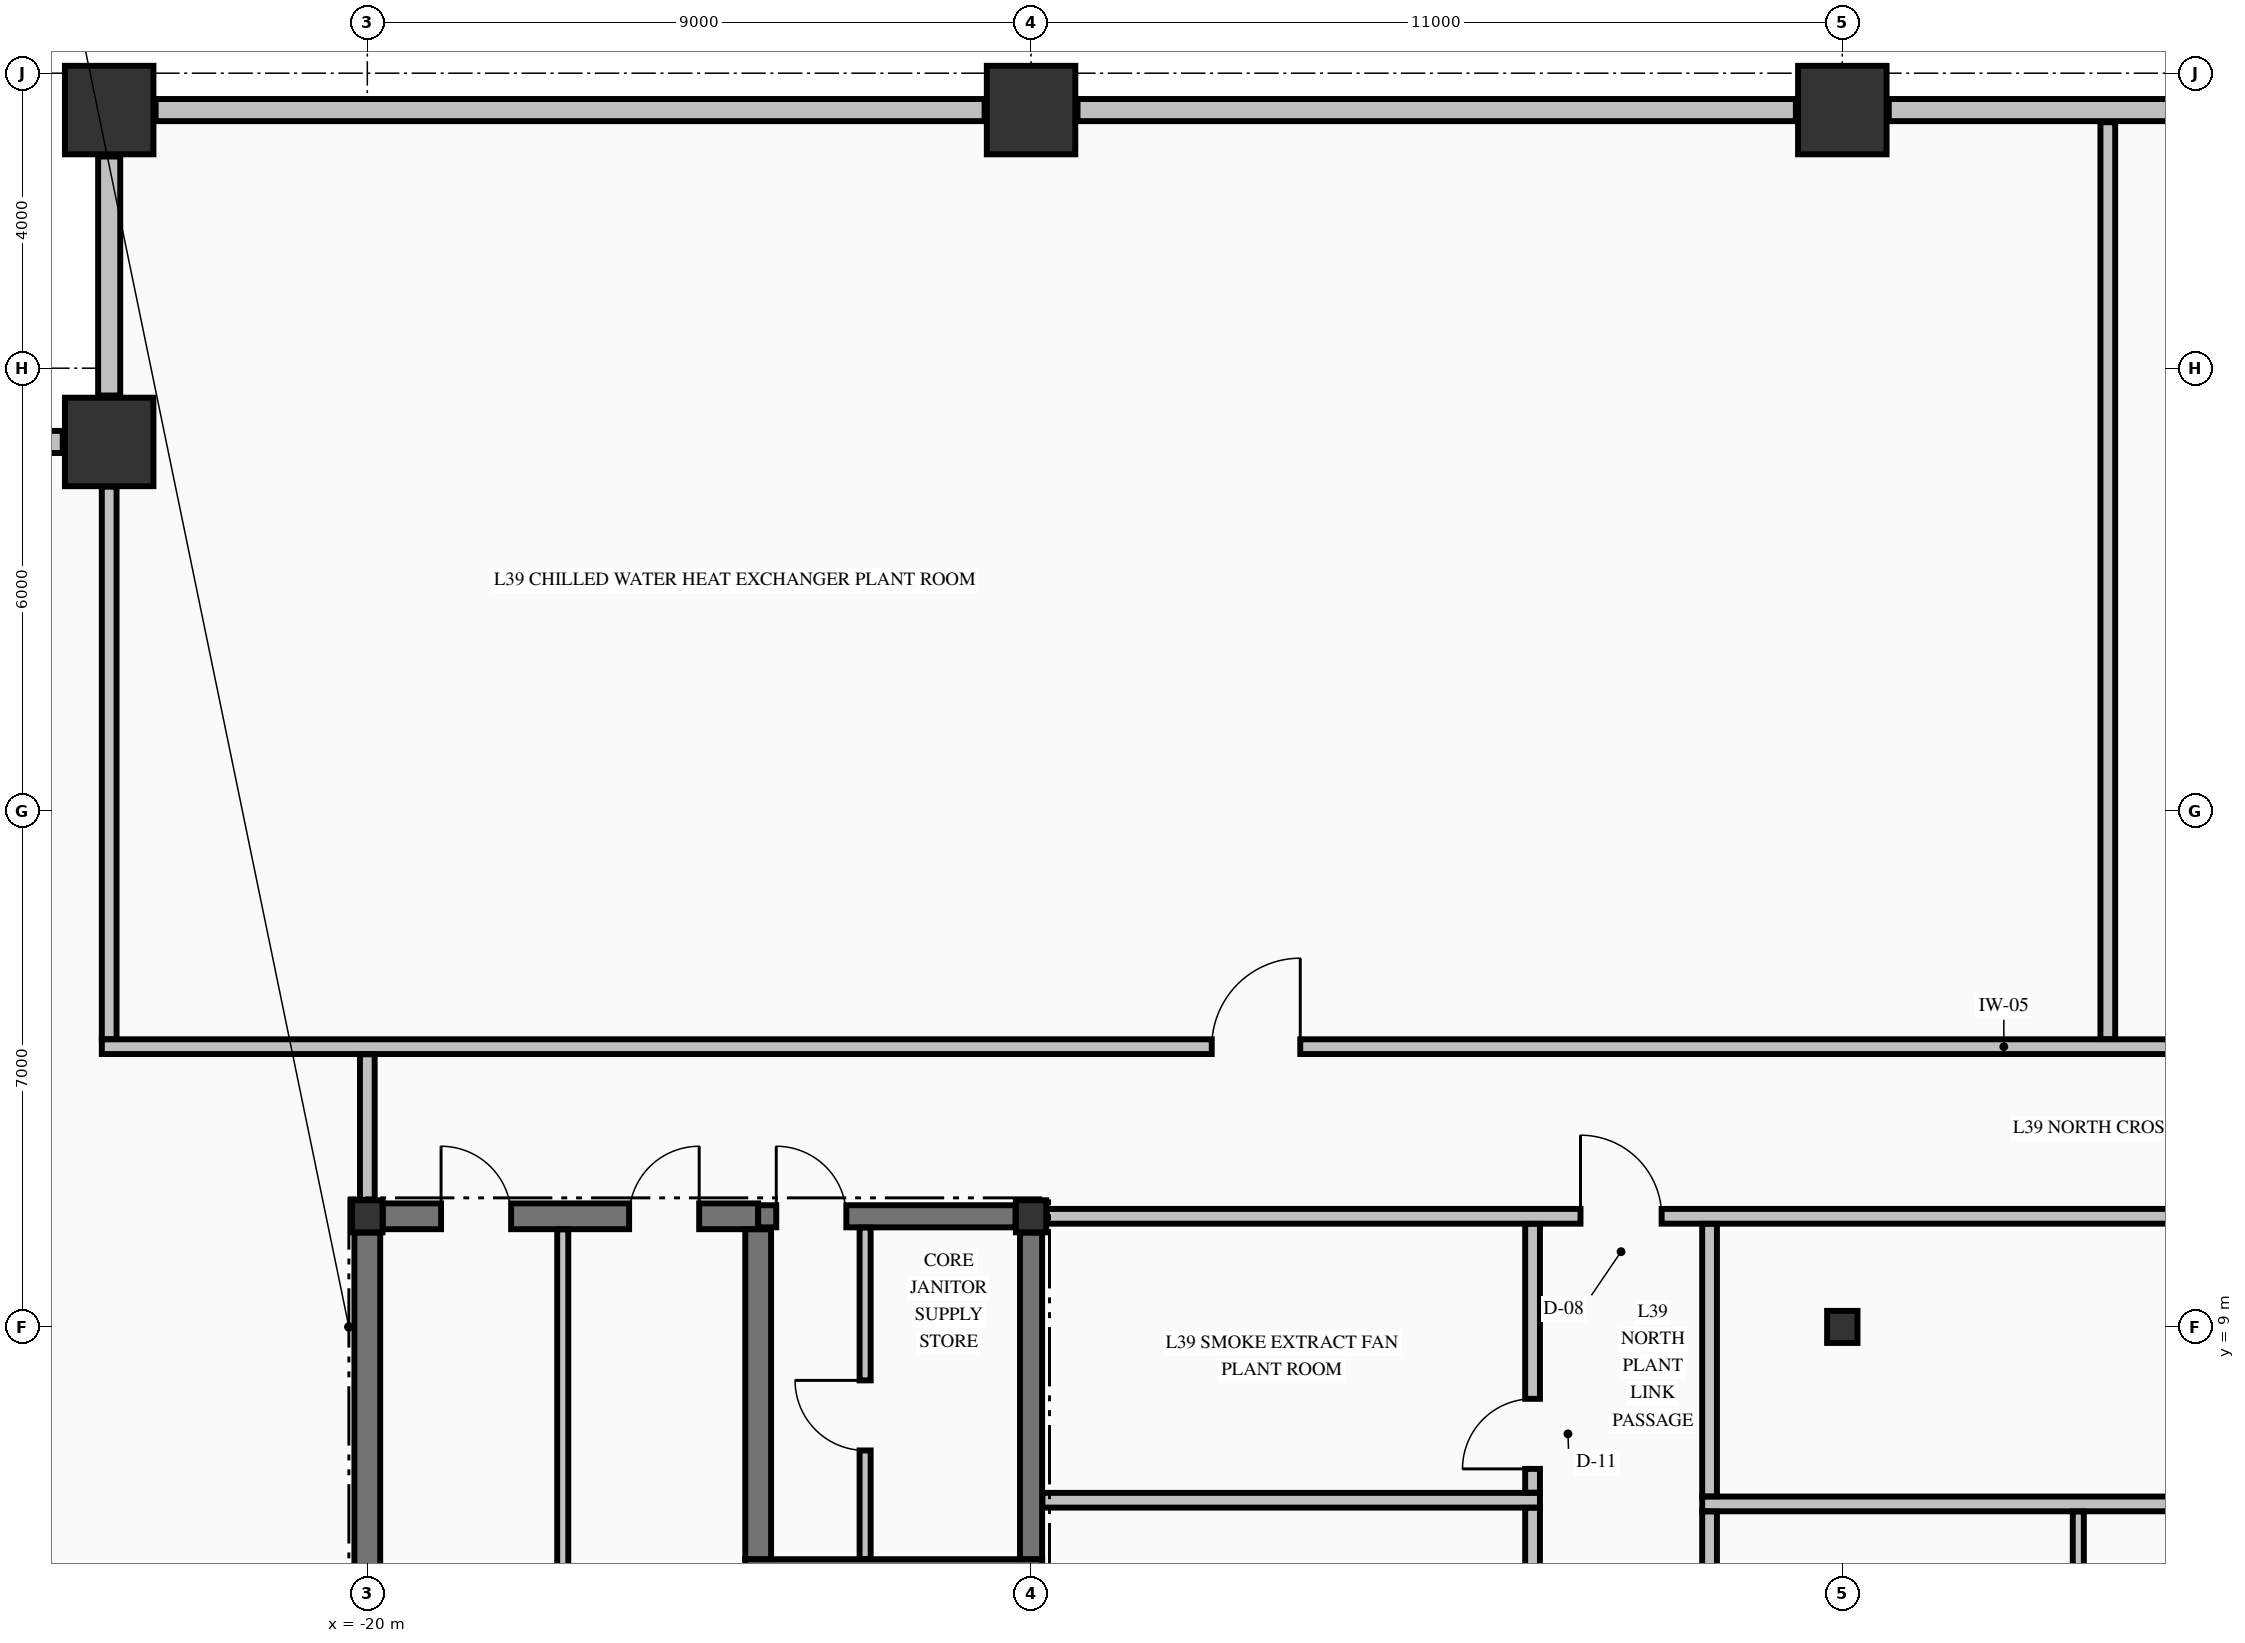
"""IFC4 building model, lengths in metres.
Left out: names, types, materials, properties, quantities, classifications, styles, units other than length and angle.
Written with IfcOpenShell. Run it as: python <this file> out.ifc"""

import sys

from ifc_helpers import new_model, si_unit, direction, frame, frame_2d, origin, origin_2d, place, context, subcontext, project, spatial, rectangle, i_section, extrude, element, fill, save


model = new_model("IFC4")
c1 = context("Model", 3, precision=1e-05, world=origin(), true_north=direction((0.0, 1.0)))
c2 = subcontext(c1, "Body", "Model", "MODEL_VIEW")
j1 = project(units=[si_unit("LENGTHUNIT", "METRE"), si_unit("PLANEANGLEUNIT", "RADIAN")], contexts=[c1])
p1 = place(None, origin())
s1 = spatial("IfcSite", under=j1, at=p1, CompositionType="ELEMENT")
p2 = place(p1, origin())
s2 = spatial("IfcBuilding", under=s1, at=p2, CompositionType="ELEMENT")
p3 = place(p2, frame((0.0, 0.0, 153.48)))
s3 = spatial("IfcBuildingStorey", under=s2, at=p3, CompositionType="ELEMENT", Elevation=153.48)
for number, where, z_axis, x_axis in (
    (1, (-23.5, 25.5, -0.425), (0.0, 0.0, 1.0), (1.0, 0.0, 0.0)),
    (2, (-11.0, 25.5, -0.425), (0.0, 0.0, 1.0), (1.0, 0.0, 0.0)),
    (3, (0.0, 25.5, -0.425), (0.0, 0.0, 1.0), (1.0, 0.0, 0.0)),
    (4, (-23.5, 21.0, -0.425), (0.0, 0.0, 1.0), (1.0, 0.0, 0.0)),
):
    element("IfcColumn", number, at=place(p3, frame(where, z_axis=z_axis, x_axis=x_axis)), inside=s3, PredefinedType="COLUMN", context=c2, shape_type="SweptSolid", body=[
        extrude(rectangle(XDim=1.2, YDim=1.2, at=origin_2d()), origin(), (0.0, 0.0, 1.0), 4.76),
    ])
for number, where, z_axis, x_axis in (
    (5, (-20.0, 10.5, -0.425), (0.0, 0.0, 1.0), (1.0, 0.0, 0.0)),
    (6, (-11.0, 10.5, -0.425), (0.0, 0.0, 1.0), (1.0, 0.0, 0.0)),
    (7, (0.0, 9.0, -0.425), (0.0, 0.0, 1.0), (1.0, 0.0, 0.0)),
):
    element("IfcColumn", number, at=place(p3, frame(where, z_axis=z_axis, x_axis=x_axis)), inside=s3, PredefinedType="COLUMN", context=c2, shape_type="SweptSolid", body=[
        extrude(i_section(OverallWidth=0.412, OverallDepth=0.435, WebThickness=0.036, FlangeThickness=0.058, FilletRadius=0.015, at=origin_2d()), origin(), (0.0, 0.0, 1.0), 4.76),
    ])
p4 = place(p3, frame((-23.5, 24.87, 0.0), z_axis=(0.0, 0.0, 1.0), x_axis=(0.0, -1.0, 0.0)))
e8 = element("IfcWall", 8, at=p4, inside=s3, PredefinedType="STANDARD", context=c2, shape_type="SweptSolid", body=[
    extrude(rectangle(XDim=3.24, YDim=0.3, at=frame_2d((1.62, 0.0))), origin(), (0.0, 0.0, 1.0), 2.527),
])
p5 = place(p3, frame((-24.13, 21.0, 0.0), z_axis=(0.0, 0.0, 1.0), x_axis=(-1.0, 0.0, 0.0)))
e9 = element("IfcWall", 9, at=p5, inside=s3, PredefinedType="STANDARD", context=c2, shape_type="SweptSolid", body=[
    extrude(rectangle(XDim=3.24, YDim=0.3, at=frame_2d((1.62, 0.0))), origin(), (0.0, 0.0, 1.0), 1.927),
])
p6 = place(p3, frame((-11.63, 25.5, 0.0), z_axis=(0.0, 0.0, 1.0), x_axis=(-1.0, 0.0, 0.0)))
e10 = element("IfcWall", 10, at=p6, inside=s3, PredefinedType="STANDARD", context=c2, shape_type="SweptSolid", body=[
    extrude(rectangle(XDim=11.24, YDim=0.3, at=frame_2d((5.62, 0.0))), origin(), (0.0, 0.0, 1.0), 1.927),
])
for number, where, z_axis, x_axis in (
    (11, (-0.63, 25.5, 0.0), (0.0, 0.0, 1.0), (-1.0, 0.0, 0.0)),
    (12, (10.37, 25.5, 0.0), (0.0, 0.0, 1.0), (-1.0, 0.0, 0.0)),
):
    element("IfcWall", number, at=place(p3, frame(where, z_axis=z_axis, x_axis=x_axis)), inside=s3, PredefinedType="STANDARD", context=c2, shape_type="SweptSolid", body=[
        extrude(rectangle(XDim=9.74, YDim=0.3, at=frame_2d((4.87, 0.0))), origin(), (0.0, 0.0, 1.0), 1.927),
    ])
p7 = place(p3, frame((-14.875, 5.7, 0.0), z_axis=(0.0, 0.0, 1.0), x_axis=(1.0, 0.0, 0.0)))
e13 = element("IfcWall", 13, at=p7, inside=s3, PredefinedType="SHEAR", context=c2, shape_type="SweptSolid", body=[
    extrude(rectangle(XDim=4.025, YDim=0.3, at=frame_2d((2.012, 0.0))), origin(), (0.0, 0.0, 1.0), 4.335),
])
p8 = place(p3, frame((-19.79, 10.5, 0.0), z_axis=(0.0, 0.0, 1.0), x_axis=(1.0, 0.0, 0.0)))
e14 = element("IfcWall", 14, at=p8, inside=s3, PredefinedType="SHEAR", context=c2, shape_type="SweptSolid", body=[
    extrude(rectangle(XDim=5.09, YDim=0.35, at=frame_2d((2.545, 0.0))), origin(), (0.0, 0.0, 1.0), 4.335),
])
p9 = place(p8, frame((0.79, 0.0, 0.0)))
e15 = element("IfcOpeningElement", 15, at=p9, cuts=e14, PredefinedType="OPENING", context=c2, shape_type="SweptSolid", body=[
    extrude(rectangle(XDim=0.95, YDim=2.02, at=frame_2d((0.475, 1.01))), frame((0.0, 0.185, 0.0), z_axis=(0.0, -1.0, 0.0), x_axis=(1.0, 0.0, 0.0)), (0.0, 0.0, 1.0), 0.37),
])
p10 = place(p8, frame((3.34, 0.0, 0.0)))
e16 = element("IfcOpeningElement", 16, at=p10, cuts=e14, PredefinedType="OPENING", context=c2, shape_type="SweptSolid", body=[
    extrude(rectangle(XDim=0.95, YDim=2.02, at=frame_2d((0.475, 1.01))), frame((0.0, 0.185, 0.0), z_axis=(0.0, -1.0, 0.0), x_axis=(1.0, 0.0, 0.0)), (0.0, 0.0, 1.0), 0.37),
])
p11 = place(p3, frame((-14.7, 10.5, 0.0), z_axis=(0.0, 0.0, 1.0), x_axis=(1.0, 0.0, 0.0)))
e17 = element("IfcWall", 17, at=p11, inside=s3, PredefinedType="SHEAR", context=c2, shape_type="SweptSolid", body=[
    extrude(rectangle(XDim=3.49, YDim=0.3, at=frame_2d((1.745, 0.0))), origin(), (0.0, 0.0, 1.0), 4.335),
])
p12 = place(p11, frame((0.245, 0.0, 0.0)))
e18 = element("IfcOpeningElement", 18, at=p12, cuts=e17, PredefinedType="OPENING", context=c2, shape_type="SweptSolid", body=[
    extrude(rectangle(XDim=0.95, YDim=2.02, at=frame_2d((0.475, 1.01))), frame((0.0, 0.16, 0.0), z_axis=(0.0, -1.0, 0.0), x_axis=(1.0, 0.0, 0.0)), (0.0, 0.0, 1.0), 0.32),
])
p13 = place(p3, frame((-1.9, 6.6, 0.0), z_axis=(0.0, 0.0, 1.0), x_axis=(1.0, 0.0, 0.0)))
e19 = element("IfcWall", 19, at=p13, inside=s3, PredefinedType="PARTITIONING", context=c2, shape_type="SweptSolid", body=[
    extrude(rectangle(XDim=12.747, YDim=0.2, at=frame_2d((6.374, 0.0))), origin(), (0.0, 0.0, 1.0), 4.335),
])
p14 = place(p3, frame((-10.847, 6.65, 0.0), z_axis=(0.0, 0.0, 1.0), x_axis=(1.0, 0.0, 0.0)))
e20 = element("IfcWall", 20, at=p14, inside=s3, PredefinedType="PARTITIONING", context=c2, shape_type="SweptSolid", body=[
    extrude(rectangle(XDim=6.747, YDim=0.2, at=frame_2d((3.374, 0.0))), origin(), (0.0, 0.0, 1.0), 4.335),
])
p15 = place(p3, frame((-10.788, 10.5, 0.0), z_axis=(0.0, 0.0, 1.0), x_axis=(1.0, 0.0, 0.0)))
e21 = element("IfcWall", 21, at=p15, inside=s3, PredefinedType="PARTITIONING", context=c2, shape_type="SweptSolid", body=[
    extrude(rectangle(XDim=21.576, YDim=0.2, at=frame_2d((10.788, 0.0))), origin(), (0.0, 0.0, 1.0), 4.335),
])
p16 = place(p15, frame((7.238, 0.0, 0.0)))
e22 = element("IfcOpeningElement", 22, at=p16, cuts=e21, PredefinedType="OPENING", context=c2, shape_type="SweptSolid", body=[
    extrude(rectangle(XDim=1.1, YDim=2.15, at=frame_2d((0.55, 1.075))), frame((0.0, 0.11, 0.0), z_axis=(0.0, -1.0, 0.0), x_axis=(1.0, 0.0, 0.0)), (0.0, 0.0, 1.0), 0.22),
])
p17 = place(p3, frame((-23.6, 12.8, 0.0), z_axis=(0.0, 0.0, 1.0), x_axis=(1.0, 0.0, 0.0)))
e23 = element("IfcWall", 23, at=p17, inside=s3, PredefinedType="PARTITIONING", context=c2, shape_type="SweptSolid", body=[
    extrude(rectangle(XDim=43.7, YDim=0.2, at=frame_2d((21.85, 0.0))), origin(), (0.0, 0.0, 1.0), 4.335),
])
p18 = place(p17, frame((15.05, 0.0, 0.0)))
e24 = element("IfcOpeningElement", 24, at=p18, cuts=e23, PredefinedType="OPENING", context=c2, shape_type="SweptSolid", body=[
    extrude(rectangle(XDim=1.2, YDim=2.15, at=frame_2d((0.6, 1.075))), frame((0.0, 0.11, 0.0), z_axis=(0.0, -1.0, 0.0), x_axis=(1.0, 0.0, 0.0)), (0.0, 0.0, 1.0), 0.22),
])
p19 = place(p17, frame((35.33, 0.0, 0.0)))
e25 = element("IfcOpeningElement", 25, at=p19, cuts=e23, PredefinedType="OPENING", context=c2, shape_type="SweptSolid", body=[
    extrude(rectangle(XDim=1.2, YDim=2.15, at=frame_2d((0.6, 1.075))), frame((0.0, 0.11, 0.0), z_axis=(0.0, -1.0, 0.0), x_axis=(1.0, 0.0, 0.0)), (0.0, 0.0, 1.0), 0.22),
])
p20 = place(p3, frame((-20.0, 0.221, 0.0), z_axis=(0.0, 0.0, 1.0), x_axis=(0.0, 1.0, 0.0)))
e26 = element("IfcWall", 26, at=p20, inside=s3, PredefinedType="SHEAR", context=c2, shape_type="SweptSolid", body=[
    extrude(rectangle(XDim=10.057, YDim=0.35, at=frame_2d((5.029, 0.0))), origin(), (0.0, 0.0, 1.0), 4.335),
])
p21 = place(p3, frame((-14.7, 5.852, 0.0), z_axis=(0.0, 0.0, 1.0), x_axis=(0.0, 1.0, 0.0)))
e27 = element("IfcWall", 27, at=p21, inside=s3, PredefinedType="SHEAR", context=c2, shape_type="SweptSolid", body=[
    extrude(rectangle(XDim=4.471, YDim=0.35, at=frame_2d((2.235, 0.0))), origin(), (0.0, 0.0, 1.0), 4.335),
])
p22 = place(p3, frame((-11.0, 5.852, 0.0), z_axis=(0.0, 0.0, 1.0), x_axis=(0.0, 1.0, 0.0)))
e28 = element("IfcWall", 28, at=p22, inside=s3, PredefinedType="SHEAR", context=c2, shape_type="SweptSolid", body=[
    extrude(rectangle(XDim=4.427, YDim=0.3, at=frame_2d((2.213, 0.0))), origin(), (0.0, 0.0, 1.0), 4.335),
])
p23 = place(p3, frame((-23.5, 12.903, 0.0), z_axis=(0.0, 0.0, 1.0), x_axis=(0.0, 1.0, 0.0)))
e29 = element("IfcWall", 29, at=p23, inside=s3, PredefinedType="PARTITIONING", context=c2, shape_type="SweptSolid", body=[
    extrude(rectangle(XDim=7.491, YDim=0.2, at=frame_2d((3.746, 0.0))), origin(), (0.0, 0.0, 1.0), 4.335),
])
p24 = place(p3, frame((-20.0, 10.723, 0.0), z_axis=(0.0, 0.0, 1.0), x_axis=(0.0, 1.0, 0.0)))
e30 = element("IfcWall", 30, at=p24, inside=s3, PredefinedType="PARTITIONING", context=c2, shape_type="SweptSolid", body=[
    extrude(rectangle(XDim=1.974, YDim=0.2, at=frame_2d((0.987, 0.0))), origin(), (0.0, 0.0, 1.0), 2.127),
])
p25 = place(p3, frame((-17.35, -0.097, 0.0), z_axis=(0.0, 0.0, 1.0), x_axis=(0.0, 1.0, 0.0)))
e31 = element("IfcWall", 31, at=p25, inside=s3, PredefinedType="PARTITIONING", context=c2, shape_type="SweptSolid", body=[
    extrude(rectangle(XDim=10.419, YDim=0.15, at=frame_2d((5.209, 0.0))), origin(), (0.0, 0.0, 1.0), 4.335),
])
p26 = place(p3, frame((-13.25, 5.853, 0.0), z_axis=(0.0, 0.0, 1.0), x_axis=(0.0, 1.0, 0.0)))
e32 = element("IfcWall", 32, at=p26, inside=s3, PredefinedType="PARTITIONING", context=c2, shape_type="SweptSolid", body=[
    extrude(rectangle(XDim=4.494, YDim=0.15, at=frame_2d((2.247, 0.0))), origin(), (0.0, 0.0, 1.0), 4.335),
])
p27 = place(p26, frame((1.472, 0.0, 0.0)))
e33 = element("IfcOpeningElement", 33, at=p27, cuts=e32, PredefinedType="OPENING", context=c2, shape_type="SweptSolid", body=[
    extrude(rectangle(XDim=0.95, YDim=2.15, at=frame_2d((0.475, 1.075))), frame((0.0, 0.085, 0.0), z_axis=(0.0, -1.0, 0.0), x_axis=(1.0, 0.0, 0.0)), (0.0, 0.0, 1.0), 0.17),
])
p28 = place(p3, frame((-4.2, 2.903, 0.0), z_axis=(0.0, 0.0, 1.0), x_axis=(0.0, 1.0, 0.0)))
e34 = element("IfcWall", 34, at=p28, inside=s3, PredefinedType="PARTITIONING", context=c2, shape_type="SweptSolid", body=[
    extrude(rectangle(XDim=3.644, YDim=0.2, at=frame_2d((1.822, 0.0))), origin(), (0.0, 0.0, 1.0), 4.335),
])
p29 = place(p28, frame((1.322, 0.0, 0.0)))
e35 = element("IfcOpeningElement", 35, at=p29, cuts=e34, PredefinedType="OPENING", context=c2, shape_type="SweptSolid", body=[
    extrude(rectangle(XDim=0.95, YDim=2.15, at=frame_2d((0.475, 1.075))), frame((0.0, 0.11, 0.0), z_axis=(0.0, -1.0, 0.0), x_axis=(1.0, 0.0, 0.0)), (0.0, 0.0, 1.0), 0.22),
])
p30 = place(p3, frame((-4.2, 6.753, 0.0), z_axis=(0.0, 0.0, 1.0), x_axis=(0.0, 1.0, 0.0)))
e36 = element("IfcWall", 36, at=p30, inside=s3, PredefinedType="PARTITIONING", context=c2, shape_type="SweptSolid", body=[
    extrude(rectangle(XDim=3.644, YDim=0.2, at=frame_2d((1.822, 0.0))), origin(), (0.0, 0.0, 1.0), 4.335),
])
p31 = place(p30, frame((0.322, 0.0, 0.0)))
e37 = element("IfcOpeningElement", 37, at=p31, cuts=e36, PredefinedType="OPENING", context=c2, shape_type="SweptSolid", body=[
    extrude(rectangle(XDim=0.95, YDim=2.15, at=frame_2d((0.475, 1.075))), frame((0.0, 0.11, 0.0), z_axis=(0.0, -1.0, 0.0), x_axis=(1.0, 0.0, 0.0)), (0.0, 0.0, 1.0), 0.22),
])
p32 = place(p3, frame((-1.8, 2.903, 0.0), z_axis=(0.0, 0.0, 1.0), x_axis=(0.0, 1.0, 0.0)))
e38 = element("IfcWall", 38, at=p32, inside=s3, PredefinedType="PARTITIONING", context=c2, shape_type="SweptSolid", body=[
    extrude(rectangle(XDim=3.594, YDim=0.2, at=frame_2d((1.797, 0.0))), origin(), (0.0, 0.0, 1.0), 4.335),
])
p33 = place(p32, frame((1.322, 0.0, 0.0)))
e39 = element("IfcOpeningElement", 39, at=p33, cuts=e38, PredefinedType="OPENING", context=c2, shape_type="SweptSolid", body=[
    extrude(rectangle(XDim=0.95, YDim=2.15, at=frame_2d((0.475, 1.075))), frame((0.0, 0.11, 0.0), z_axis=(0.0, -1.0, 0.0), x_axis=(1.0, 0.0, 0.0)), (0.0, 0.0, 1.0), 0.22),
])
p34 = place(p3, frame((-1.8, 6.703, 0.0), z_axis=(0.0, 0.0, 1.0), x_axis=(0.0, 1.0, 0.0)))
e40 = element("IfcWall", 40, at=p34, inside=s3, PredefinedType="PARTITIONING", context=c2, shape_type="SweptSolid", body=[
    extrude(rectangle(XDim=3.694, YDim=0.2, at=frame_2d((1.847, 0.0))), origin(), (0.0, 0.0, 1.0), 4.335),
])
p35 = place(p3, frame((3.2, 2.903, 0.0), z_axis=(0.0, 0.0, 1.0), x_axis=(0.0, 1.0, 0.0)))
e41 = element("IfcWall", 41, at=p35, inside=s3, PredefinedType="PARTITIONING", context=c2, shape_type="SweptSolid", body=[
    extrude(rectangle(XDim=3.594, YDim=0.15, at=frame_2d((1.797, 0.0))), origin(), (0.0, 0.0, 1.0), 4.335),
])
p36 = place(p3, frame((3.6, 12.903, 0.0), z_axis=(0.0, 0.0, 1.0), x_axis=(0.0, 1.0, 0.0)))
e42 = element("IfcWall", 42, at=p36, inside=s3, PredefinedType="PARTITIONING", context=c2, shape_type="SweptSolid", body=[
    extrude(rectangle(XDim=12.432, YDim=0.2, at=frame_2d((6.216, 0.0))), origin(), (0.0, 0.0, 1.0), 4.335),
])
p37 = place(p12, origin())
e43 = element("IfcDoor", 43, at=p37, inside=s3, OperationType="SINGLE_SWING_LEFT", PredefinedType="DOOR", context=c2, shape_type="SweptSolid", body=[
    extrude(rectangle(XDim=0.95, YDim=2.02, at=frame_2d((0.475, 1.01))), frame((0.0, 0.025, 0.0), z_axis=(0.0, -1.0, 0.0), x_axis=(1.0, 0.0, 0.0)), (0.0, 0.0, 1.0), 0.05),
])
fill(e18, e43)
p38 = place(p27, origin())
e44 = element("IfcDoor", 44, at=p38, inside=s3, OperationType="SINGLE_SWING_RIGHT", PredefinedType="DOOR", context=c2, shape_type="SweptSolid", body=[
    extrude(rectangle(XDim=0.95, YDim=2.15, at=frame_2d((0.475, 1.075))), frame((0.0, 0.025, 0.0), z_axis=(0.0, -1.0, 0.0), x_axis=(1.0, 0.0, 0.0)), (0.0, 0.0, 1.0), 0.05),
])
fill(e33, e44)
p39 = place(p9, origin())
e45 = element("IfcDoor", 45, at=p39, inside=s3, OperationType="SINGLE_SWING_LEFT", PredefinedType="DOOR", context=c2, shape_type="SweptSolid", body=[
    extrude(rectangle(XDim=0.95, YDim=2.02, at=frame_2d((0.475, 1.01))), frame((0.0, 0.025, 0.0), z_axis=(0.0, -1.0, 0.0), x_axis=(1.0, 0.0, 0.0)), (0.0, 0.0, 1.0), 0.05),
])
fill(e15, e45)
p40 = place(p10, origin())
e46 = element("IfcDoor", 46, at=p40, inside=s3, OperationType="SINGLE_SWING_RIGHT", PredefinedType="DOOR", context=c2, shape_type="SweptSolid", body=[
    extrude(rectangle(XDim=0.95, YDim=2.02, at=frame_2d((0.475, 1.01))), frame((0.0, 0.025, 0.0), z_axis=(0.0, -1.0, 0.0), x_axis=(1.0, 0.0, 0.0)), (0.0, 0.0, 1.0), 0.05),
])
fill(e16, e46)
p41 = place(p16, origin())
e47 = element("IfcDoor", 47, at=p41, inside=s3, OperationType="SINGLE_SWING_LEFT", PredefinedType="DOOR", context=c2, shape_type="SweptSolid", body=[
    extrude(rectangle(XDim=1.1, YDim=2.15, at=frame_2d((0.55, 1.075))), frame((0.0, 0.025, 0.0), z_axis=(0.0, -1.0, 0.0), x_axis=(1.0, 0.0, 0.0)), (0.0, 0.0, 1.0), 0.05),
])
fill(e22, e47)
p42 = place(p18, origin())
e48 = element("IfcDoor", 48, at=p42, inside=s3, OperationType="SINGLE_SWING_RIGHT", PredefinedType="DOOR", context=c2, shape_type="SweptSolid", body=[
    extrude(rectangle(XDim=1.2, YDim=2.15, at=frame_2d((0.6, 1.075))), frame((0.0, 0.025, 0.0), z_axis=(0.0, -1.0, 0.0), x_axis=(1.0, 0.0, 0.0)), (0.0, 0.0, 1.0), 0.05),
])
fill(e24, e48)
p43 = place(p31, origin())
e49 = element("IfcDoor", 49, at=p43, inside=s3, OperationType="SINGLE_SWING_LEFT", PredefinedType="DOOR", context=c2, shape_type="SweptSolid", body=[
    extrude(rectangle(XDim=0.95, YDim=2.15, at=frame_2d((0.475, 1.075))), frame((0.0, 0.025, 0.0), z_axis=(0.0, -1.0, 0.0), x_axis=(1.0, 0.0, 0.0)), (0.0, 0.0, 1.0), 0.05),
])
fill(e37, e49)
save(model, sys.argv[1])
